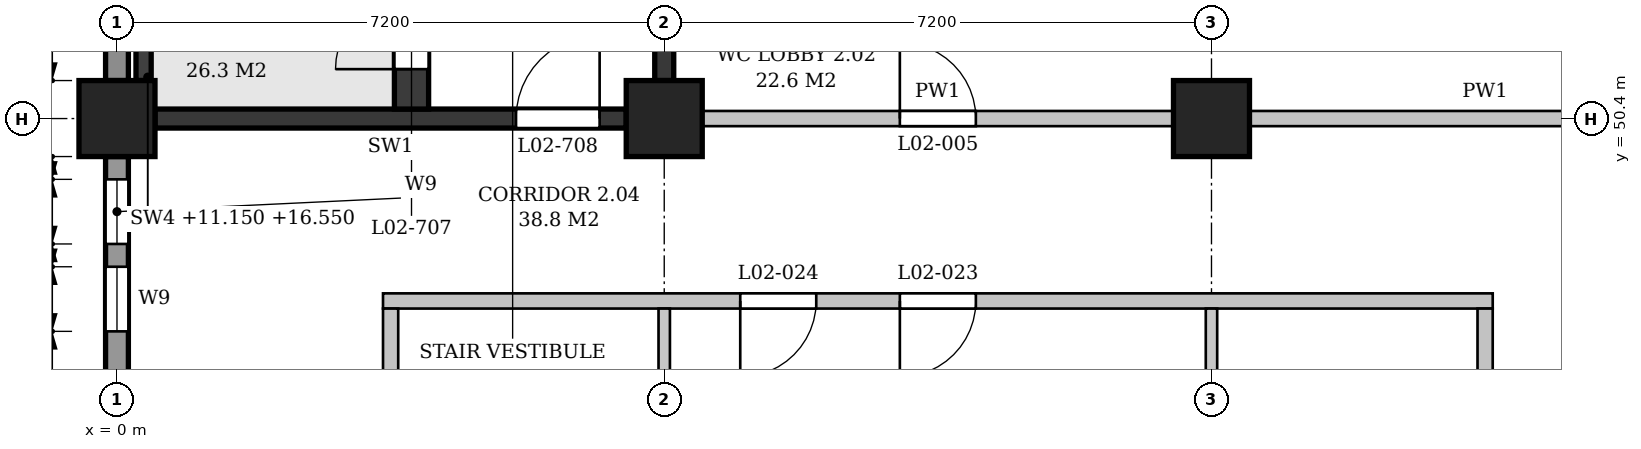
"""IFC4 building model, lengths in metres.
Left out: names, types, materials, properties, quantities, classifications, styles, units other than length and angle.
Written with IfcOpenShell. Run it as: python <this file> out.ifc"""

import sys

from ifc_helpers import new_model, si_unit, direction, frame, frame_2d, origin, origin_2d, place, context, subcontext, project, spatial, polyline, rectangle, outline, extrude, element, fill, save


model = new_model("IFC4")
c1 = context("Model", 3, precision=1e-05, world=origin(), true_north=direction((0.0, 1.0)))
c2 = subcontext(c1, "Body", "Model", "MODEL_VIEW")
j1 = project(units=[si_unit("LENGTHUNIT", "METRE"), si_unit("PLANEANGLEUNIT", "RADIAN")], contexts=[c1])
p1 = place(None, origin())
s1 = spatial("IfcSite", under=j1, at=p1, CompositionType="ELEMENT")
p2 = place(p1, origin())
s2 = spatial("IfcBuilding", under=s1, at=p2, CompositionType="ELEMENT")
p3 = place(p2, frame((0.0, 0.0, 11.4)))
s3 = spatial("IfcBuildingStorey", under=s2, at=p3, CompositionType="ELEMENT", Elevation=11.4)
for number, where, z_axis, x_axis in (
    (1, (0.0, 50.4, 0.0), (0.0, 0.0, 1.0), (1.0, 0.0, 0.0)),
    (2, (7.2, 50.4, 0.0), (0.0, 0.0, 1.0), (1.0, 0.0, 0.0)),
    (3, (14.4, 50.4, 0.0), (0.0, 0.0, 1.0), (1.0, 0.0, 0.0)),
):
    element("IfcColumn", number, at=place(p3, frame(where, z_axis=z_axis, x_axis=x_axis)), inside=s3, PredefinedType="COLUMN", context=c2, shape_type="SweptSolid", body=[
        extrude(rectangle(XDim=1.0, YDim=1.0, at=origin_2d()), origin(), (0.0, 0.0, 1.0), 5.4),
    ])
p4 = place(p3, frame((0.0, 43.7, 0.0), z_axis=(0.0, 0.0, 1.0), x_axis=(0.0, 1.0, 0.0)))
e4 = element("IfcWall", 4, at=p4, inside=s3, PredefinedType="STANDARD", context=c2, shape_type="SweptSolid", body=[
    extrude(rectangle(XDim=6.2, YDim=0.3, at=frame_2d((3.1, 0.0))), origin(), (0.0, 0.0, 1.0), 4.55),
])
p5 = place(p4, frame((0.3, 0.0, 0.9)))
e5 = element("IfcOpeningElement", 5, at=p5, cuts=e4, PredefinedType="OPENING", context=c2, shape_type="SweptSolid", body=[
    extrude(outline(polyline([(0.0, 0.0), (0.85, 0.0), (0.85, 2.65), (0.425, 3.1), (0.0, 2.65), (0.0, 0.0)])), frame((0.0, 0.16, 0.0), z_axis=(0.0, -1.0, 0.0), x_axis=(1.0, 0.0, 0.0)), (0.0, 0.0, 1.0), 0.32),
])
p6 = place(p4, frame((1.45, 0.0, 0.9)))
e6 = element("IfcOpeningElement", 6, at=p6, cuts=e4, PredefinedType="OPENING", context=c2, shape_type="SweptSolid", body=[
    extrude(outline(polyline([(0.0, 0.0), (0.85, 0.0), (0.85, 2.65), (0.425, 3.1), (0.0, 2.65), (0.0, 0.0)])), frame((0.0, 0.16, 0.0), z_axis=(0.0, -1.0, 0.0), x_axis=(1.0, 0.0, 0.0)), (0.0, 0.0, 1.0), 0.32),
])
p7 = place(p4, frame((3.9, 0.0, 0.9)))
e7 = element("IfcOpeningElement", 7, at=p7, cuts=e4, PredefinedType="OPENING", context=c2, shape_type="SweptSolid", body=[
    extrude(outline(polyline([(0.0, 0.0), (0.85, 0.0), (0.85, 2.65), (0.425, 3.1), (0.0, 2.65), (0.0, 0.0)])), frame((0.0, 0.16, 0.0), z_axis=(0.0, -1.0, 0.0), x_axis=(1.0, 0.0, 0.0)), (0.0, 0.0, 1.0), 0.32),
])
p8 = place(p4, frame((5.05, 0.0, 0.9)))
e8 = element("IfcOpeningElement", 8, at=p8, cuts=e4, PredefinedType="OPENING", context=c2, shape_type="SweptSolid", body=[
    extrude(outline(polyline([(0.0, 0.0), (0.85, 0.0), (0.85, 2.65), (0.425, 3.1), (0.0, 2.65), (0.0, 0.0)])), frame((0.0, 0.16, 0.0), z_axis=(0.0, -1.0, 0.0), x_axis=(1.0, 0.0, 0.0)), (0.0, 0.0, 1.0), 0.32),
])
p9 = place(p3, frame((0.0, 50.9, 0.0), z_axis=(0.0, 0.0, 1.0), x_axis=(0.0, 1.0, 0.0)))
e9 = element("IfcWall", 9, at=p9, inside=s3, PredefinedType="STANDARD", context=c2, shape_type="SweptSolid", body=[
    extrude(rectangle(XDim=6.2, YDim=0.3, at=frame_2d((3.1, 0.0))), origin(), (0.0, 0.0, 1.0), 4.55),
])
p10 = place(p9, frame((0.85, 0.0, 0.9)))
e10 = element("IfcOpeningElement", 10, at=p10, cuts=e9, PredefinedType="OPENING", context=c2, shape_type="SweptSolid", body=[
    extrude(outline(polyline([(0.0, 0.0), (0.9, 0.0), (0.9, 2.65), (0.45, 3.1), (0.0, 2.65), (0.0, 0.0)])), frame((0.0, 0.16, 0.0), z_axis=(0.0, -1.0, 0.0), x_axis=(1.0, 0.0, 0.0)), (0.0, 0.0, 1.0), 0.32),
])
p11 = place(p9, frame((4.45, 0.0, 0.9)))
e11 = element("IfcOpeningElement", 11, at=p11, cuts=e9, PredefinedType="OPENING", context=c2, shape_type="SweptSolid", body=[
    extrude(outline(polyline([(0.0, 0.0), (0.9, 0.0), (0.9, 2.65), (0.45, 3.1), (0.0, 2.65), (0.0, 0.0)])), frame((0.0, 0.16, 0.0), z_axis=(0.0, -1.0, 0.0), x_axis=(1.0, 0.0, 0.0)), (0.0, 0.0, 1.0), 0.32),
])
p12 = place(p3, frame((0.5, 50.4, 0.0), z_axis=(0.0, 0.0, 1.0), x_axis=(1.0, 0.0, 0.0)))
e12 = element("IfcWall", 12, at=p12, inside=s3, PredefinedType="SHEAR", context=c2, shape_type="SweptSolid", body=[
    extrude(rectangle(XDim=6.2, YDim=0.25, at=frame_2d((3.1, 0.0))), origin(), (0.0, 0.0, 1.0), 4.4),
])
p13 = place(p12, frame((4.75, 0.0, 0.0)))
e13 = element("IfcOpeningElement", 13, at=p13, cuts=e12, PredefinedType="OPENING", context=c2, shape_type="SweptSolid", body=[
    extrude(rectangle(XDim=1.1, YDim=2.1, at=frame_2d((0.55, 1.05))), frame((0.0, 0.135, 0.0), z_axis=(0.0, -1.0, 0.0), x_axis=(1.0, 0.0, 0.0)), (0.0, 0.0, 1.0), 0.27),
])
p14 = place(p3, frame((7.2, 50.9, 0.0), z_axis=(0.0, 0.0, 1.0), x_axis=(0.0, 1.0, 0.0)))
e14 = element("IfcWall", 14, at=p14, inside=s3, PredefinedType="SHEAR", context=c2, shape_type="SweptSolid", body=[
    extrude(rectangle(XDim=6.2, YDim=0.25, at=frame_2d((3.1, 0.0))), origin(), (0.0, 0.0, 1.0), 4.4),
])
p15 = place(p3, frame((0.35, 50.9, -0.25), z_axis=(0.0, 0.0, 1.0), x_axis=(0.0, 1.0, 0.0)))
e15 = element("IfcWall", 15, at=p15, inside=s3, PredefinedType="SHEAR", context=c2, shape_type="SweptSolid", body=[
    extrude(rectangle(XDim=0.85, YDim=0.2, at=frame_2d((0.425, 0.0))), origin(), (0.0, 0.0, 1.0), 5.4),
])
p16 = place(p3, frame((3.875, 50.525, 0.0), z_axis=(0.0, 0.0, 1.0), x_axis=(0.0, 1.0, 0.0)))
e16 = element("IfcWall", 16, at=p16, inside=s3, PredefinedType="SHEAR", context=c2, shape_type="SweptSolid", body=[
    extrude(rectangle(XDim=6.85, YDim=0.45, at=frame_2d((3.425, 0.0))), origin(), (0.0, 0.0, 1.0), 5.15),
])
p17 = place(p16, frame((0.525, 0.0, 0.0)))
e17 = element("IfcOpeningElement", 17, at=p17, cuts=e16, PredefinedType="OPENING", context=c2, shape_type="SweptSolid", body=[
    extrude(rectangle(XDim=1.0, YDim=2.1, at=frame_2d((0.5, 1.05))), frame((0.0, 0.235, 0.0), z_axis=(0.0, -1.0, 0.0), x_axis=(1.0, 0.0, 0.0)), (0.0, 0.0, 1.0), 0.47),
])
p18 = place(p3, frame((3.5, 48.0, 0.0), z_axis=(0.0, 0.0, 1.0), x_axis=(1.0, 0.0, 0.0)))
e18 = element("IfcWall", 18, at=p18, inside=s3, PredefinedType="PARTITIONING", context=c2, shape_type="SweptSolid", body=[
    extrude(outline(polyline([(0.0, 0.0), (14.6, 0.0), (14.6, 5.15), (11.15, 5.15), (11.15, 4.4), (10.65, 4.4), (10.65, 5.15), (3.95, 5.15), (3.95, 4.4), (3.45, 4.4), (3.45, 5.15), (0.0, 5.15), (0.0, 0.0)])), frame((0.0, 0.1, 0.0), z_axis=(0.0, -1.0, 0.0), x_axis=(1.0, 0.0, 0.0)), (0.0, 0.0, 1.0), 0.2),
])
p19 = place(p18, frame((6.8, 0.0, 0.0)))
e19 = element("IfcOpeningElement", 19, at=p19, cuts=e18, PredefinedType="OPENING", context=c2, shape_type="SweptSolid", body=[
    extrude(rectangle(XDim=1.0, YDim=2.1, at=frame_2d((0.5, 1.05))), frame((0.0, 0.11, 0.0), z_axis=(0.0, -1.0, 0.0), x_axis=(1.0, 0.0, 0.0)), (0.0, 0.0, 1.0), 0.22),
])
p20 = place(p18, frame((4.7, 0.0, 0.0)))
e20 = element("IfcOpeningElement", 20, at=p20, cuts=e18, PredefinedType="OPENING", context=c2, shape_type="SweptSolid", body=[
    extrude(rectangle(XDim=1.0, YDim=2.1, at=frame_2d((0.5, 1.05))), frame((0.0, 0.11, 0.0), z_axis=(0.0, -1.0, 0.0), x_axis=(1.0, 0.0, 0.0)), (0.0, 0.0, 1.0), 0.22),
])
p21 = place(p3, frame((7.7, 50.4, 0.0), z_axis=(0.0, 0.0, 1.0), x_axis=(1.0, 0.0, 0.0)))
e21 = element("IfcWall", 21, at=p21, inside=s3, PredefinedType="PARTITIONING", context=c2, shape_type="SweptSolid", body=[
    extrude(rectangle(XDim=6.2, YDim=0.2, at=frame_2d((3.1, 0.0))), origin(), (0.0, 0.0, 1.0), 4.4),
])
p22 = place(p21, frame((2.6, 0.0, 0.0)))
e22 = element("IfcOpeningElement", 22, at=p22, cuts=e21, PredefinedType="OPENING", context=c2, shape_type="SweptSolid", body=[
    extrude(rectangle(XDim=1.0, YDim=2.1, at=frame_2d((0.5, 1.05))), frame((0.0, 0.11, 0.0), z_axis=(0.0, -1.0, 0.0), x_axis=(1.0, 0.0, 0.0)), (0.0, 0.0, 1.0), 0.22),
])
p23 = place(p3, frame((14.9, 50.4, 0.0), z_axis=(0.0, 0.0, 1.0), x_axis=(1.0, 0.0, 0.0)))
e23 = element("IfcWall", 23, at=p23, inside=s3, PredefinedType="PARTITIONING", context=c2, shape_type="SweptSolid", body=[
    extrude(rectangle(XDim=6.2, YDim=0.2, at=frame_2d((3.1, 0.0))), origin(), (0.0, 0.0, 1.0), 4.4),
])
p24 = place(p23, frame((4.15, 0.0, 0.0)))
e24 = element("IfcOpeningElement", 24, at=p24, cuts=e23, PredefinedType="OPENING", context=c2, shape_type="SweptSolid", body=[
    extrude(rectangle(XDim=1.0, YDim=2.1, at=frame_2d((0.5, 1.05))), frame((0.0, 0.11, 0.0), z_axis=(0.0, -1.0, 0.0), x_axis=(1.0, 0.0, 0.0)), (0.0, 0.0, 1.0), 0.22),
])
p25 = place(p3, frame((3.6, 38.5, 0.0), z_axis=(0.0, 0.0, 1.0), x_axis=(0.0, 1.0, 0.0)))
e25 = element("IfcWall", 25, at=p25, inside=s3, PredefinedType="PARTITIONING", context=c2, shape_type="SweptSolid", body=[
    extrude(outline(polyline([(0.0, 0.0), (9.4, 0.0), (9.4, 5.15), (4.95, 5.15), (4.95, 4.4), (4.45, 4.4), (4.45, 5.15), (0.0, 5.15), (0.0, 0.0)])), frame((0.0, 0.1, 0.0), z_axis=(0.0, -1.0, 0.0), x_axis=(1.0, 0.0, 0.0)), (0.0, 0.0, 1.0), 0.2),
])
p26 = place(p25, frame((4.2, 0.0, 0.0)))
e26 = element("IfcOpeningElement", 26, at=p26, cuts=e25, PredefinedType="OPENING", context=c2, shape_type="SweptSolid", body=[
    extrude(rectangle(XDim=1.0, YDim=2.1, at=frame_2d((0.5, 1.05))), frame((0.0, 0.11, 0.0), z_axis=(0.0, -1.0, 0.0), x_axis=(1.0, 0.0, 0.0)), (0.0, 0.0, 1.0), 0.22),
])
for number, where, z_axis, x_axis in (
    (27, (7.2, 43.7, 0.0), (0.0, 0.0, 1.0), (0.0, 1.0, 0.0)),
    (28, (14.4, 43.7, 0.0), (0.0, 0.0, 1.0), (0.0, 1.0, 0.0)),
):
    element("IfcWall", number, at=place(p3, frame(where, z_axis=z_axis, x_axis=x_axis)), inside=s3, PredefinedType="PARTITIONING", context=c2, shape_type="SweptSolid", body=[
        extrude(rectangle(XDim=4.2, YDim=0.15, at=frame_2d((2.1, 0.0))), origin(), (0.0, 0.0, 1.0), 4.4),
    ])
p27 = place(p3, frame((18.0, 38.5, 0.0), z_axis=(0.0, 0.0, 1.0), x_axis=(0.0, 1.0, 0.0)))
e29 = element("IfcWall", 29, at=p27, inside=s3, PredefinedType="PARTITIONING", context=c2, shape_type="SweptSolid", body=[
    extrude(outline(polyline([(0.0, 0.0), (9.4, 0.0), (9.4, 5.15), (4.95, 5.15), (4.95, 4.4), (4.45, 4.4), (4.45, 5.15), (0.0, 5.15), (0.0, 0.0)])), frame((0.0, 0.1, 0.0), z_axis=(0.0, -1.0, 0.0), x_axis=(1.0, 0.0, 0.0)), (0.0, 0.0, 1.0), 0.2),
])
p28 = place(p27, frame((4.2, 0.0, 0.0)))
e30 = element("IfcOpeningElement", 30, at=p28, cuts=e29, PredefinedType="OPENING", context=c2, shape_type="SweptSolid", body=[
    extrude(rectangle(XDim=1.0, YDim=2.1, at=frame_2d((0.5, 1.05))), frame((0.0, 0.11, 0.0), z_axis=(0.0, -1.0, 0.0), x_axis=(1.0, 0.0, 0.0)), (0.0, 0.0, 1.0), 0.22),
])
p29 = place(p7, origin())
e31 = element("IfcWindow", 31, at=p29, inside=s3, PartitioningType="SINGLE_PANEL", PredefinedType="WINDOW", context=c2, shape_type="SweptSolid", body=[
    extrude(outline(polyline([(0.0, 0.0), (0.85, 0.0), (0.85, 2.65), (0.425, 3.1), (0.0, 2.65), (0.0, 0.0)])), frame((0.0, 0.03, 0.0), z_axis=(0.0, -1.0, 0.0), x_axis=(1.0, 0.0, 0.0)), (0.0, 0.0, 1.0), 0.06),
])
fill(e7, e31)
p30 = place(p8, origin())
e32 = element("IfcWindow", 32, at=p30, inside=s3, PartitioningType="SINGLE_PANEL", PredefinedType="WINDOW", context=c2, shape_type="SweptSolid", body=[
    extrude(outline(polyline([(0.0, 0.0), (0.85, 0.0), (0.85, 2.65), (0.425, 3.1), (0.0, 2.65), (0.0, 0.0)])), frame((0.0, 0.03, 0.0), z_axis=(0.0, -1.0, 0.0), x_axis=(1.0, 0.0, 0.0)), (0.0, 0.0, 1.0), 0.06),
])
fill(e8, e32)
p31 = place(p17, origin())
e33 = element("IfcDoor", 33, at=p31, inside=s3, OperationType="SINGLE_SWING_LEFT", PredefinedType="DOOR", context=c2, shape_type="SweptSolid", body=[
    extrude(rectangle(XDim=1.0, YDim=2.1, at=frame_2d((0.5, 1.05))), frame((0.0, 0.025, 0.0), z_axis=(0.0, -1.0, 0.0), x_axis=(1.0, 0.0, 0.0)), (0.0, 0.0, 1.0), 0.05),
])
fill(e17, e33)
p32 = place(p13, origin())
e34 = element("IfcDoor", 34, at=p32, inside=s3, OperationType="SINGLE_SWING_RIGHT", PredefinedType="DOOR", context=c2, shape_type="SweptSolid", body=[
    extrude(rectangle(XDim=1.1, YDim=2.1, at=frame_2d((0.55, 1.05))), frame((0.0, 0.025, 0.0), z_axis=(0.0, -1.0, 0.0), x_axis=(1.0, 0.0, 0.0)), (0.0, 0.0, 1.0), 0.05),
])
fill(e13, e34)
p33 = place(p22, origin())
e35 = element("IfcDoor", 35, at=p33, inside=s3, OperationType="SINGLE_SWING_LEFT", PredefinedType="DOOR", context=c2, shape_type="SweptSolid", body=[
    extrude(rectangle(XDim=1.0, YDim=2.1, at=frame_2d((0.5, 1.05))), frame((0.0, 0.025, 0.0), z_axis=(0.0, -1.0, 0.0), x_axis=(1.0, 0.0, 0.0)), (0.0, 0.0, 1.0), 0.05),
])
fill(e22, e35)
p34 = place(p19, frame((1.0, 0.0, 0.0), z_axis=(0.0, 0.0, 1.0), x_axis=(-1.0, 0.0, 0.0)))
e36 = element("IfcDoor", 36, at=p34, inside=s3, OperationType="SINGLE_SWING_RIGHT", PredefinedType="DOOR", context=c2, shape_type="SweptSolid", body=[
    extrude(rectangle(XDim=1.0, YDim=2.1, at=frame_2d((0.5, 1.05))), frame((0.0, 0.025, 0.0), z_axis=(0.0, -1.0, 0.0), x_axis=(1.0, 0.0, 0.0)), (0.0, 0.0, 1.0), 0.05),
])
fill(e19, e36)
p35 = place(p20, frame((1.0, 0.0, 0.0), z_axis=(0.0, 0.0, 1.0), x_axis=(-1.0, 0.0, 0.0)))
e37 = element("IfcDoor", 37, at=p35, inside=s3, OperationType="SINGLE_SWING_RIGHT", PredefinedType="DOOR", context=c2, shape_type="SweptSolid", body=[
    extrude(rectangle(XDim=1.0, YDim=2.1, at=frame_2d((0.5, 1.05))), frame((0.0, 0.025, 0.0), z_axis=(0.0, -1.0, 0.0), x_axis=(1.0, 0.0, 0.0)), (0.0, 0.0, 1.0), 0.05),
])
fill(e20, e37)
save(model, sys.argv[1])
